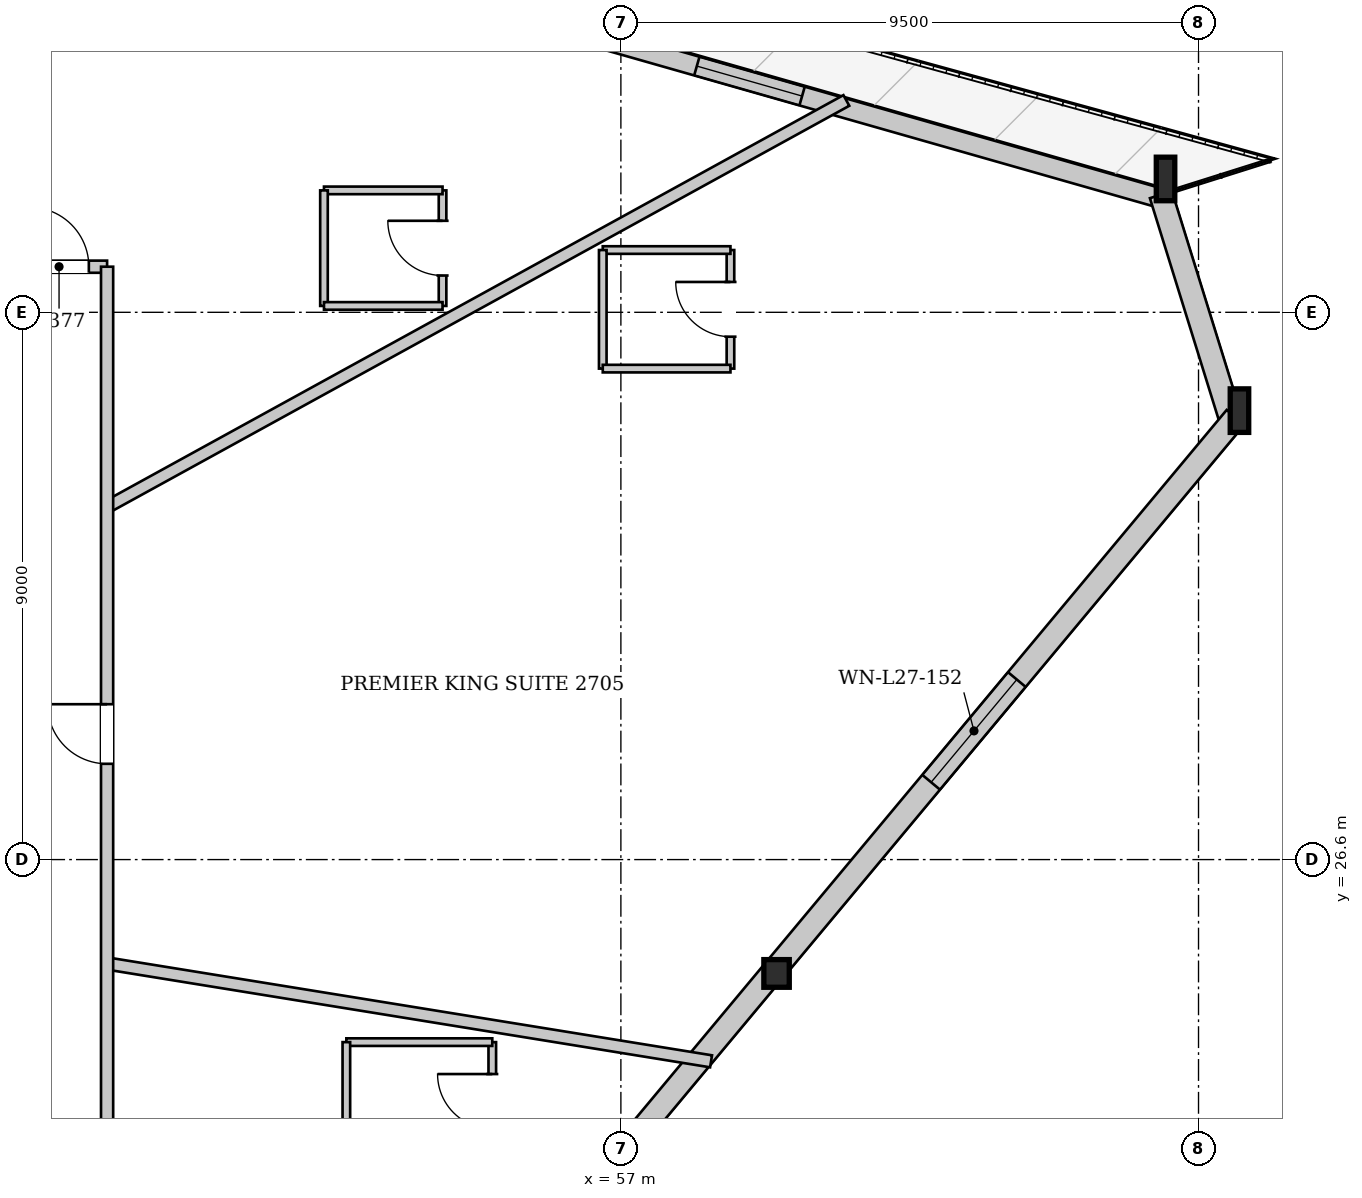
"""IFC4 building model, lengths in metres.
Left out: names, types, materials, properties, quantities, classifications, styles, units other than length and angle.
Written with IfcOpenShell. Run it as: python <this file> out.ifc"""

import sys

from ifc_helpers import new_model, si_unit, direction, frame, frame_2d, origin, origin_2d, place, context, subcontext, project, spatial, rectangle, i_section, extrude, source, transform, mapped, element, fill, save


model = new_model("IFC4")
c1 = context("Model", 3, precision=1e-05, world=origin(), true_north=direction((0.0, 1.0)))
c2 = subcontext(c1, "Body", "Model", "MODEL_VIEW")
j1 = project(units=[si_unit("LENGTHUNIT", "METRE"), si_unit("PLANEANGLEUNIT", "RADIAN")], contexts=[c1])
p1 = place(None, origin())
s1 = spatial("IfcSite", under=j1, at=p1, CompositionType="ELEMENT")
p2 = place(p1, origin())
s2 = spatial("IfcBuilding", under=s1, at=p2, CompositionType="ELEMENT")
p3 = place(p2, frame((0.0, 0.0, 105.7)))
s3 = spatial("IfcBuildingStorey", under=s2, at=p3, CompositionType="ELEMENT", Elevation=105.7)
m1 = source(origin(), c2, "Body", "SweptSolid", [
    extrude(i_section(OverallWidth=0.304, OverallDepth=0.716, WebThickness=0.021, FlangeThickness=0.04, at=origin_2d()), origin(), (0.0, 0.0, 1.0), 3.42),
])
p4 = place(p3, frame((67.255, 33.752, 0.0), z_axis=(-0.047894435472, 0.135260738032, 0.989651785123), x_axis=(-0.942650051896, -0.333782683284, 0.0)))
e1 = element("IfcColumn", 1, at=p4, inside=s3, PredefinedType="COLUMN", context=c2, shape_type="MappedRepresentation", body=[
    mapped(m1, transform((0.0, 0.0, 0.0), x_axis=(1.0, 0.0, 0.0), y_axis=(0.0, 1.0, 0.0), z_axis=(0.0, 0.0, 1.0), scale=1.0)),
])
m2 = source(origin(), c2, "Body", "SweptSolid", [
    extrude(i_section(OverallWidth=0.304, OverallDepth=0.716, WebThickness=0.021, FlangeThickness=0.04, at=origin_2d()), origin(), (0.0, 0.0, 1.0), 3.416),
])
p5 = place(p3, frame((66.063, 37.59, 0.0), z_axis=(-0.062036324357, 0.119141189749, 0.990937370052), x_axis=(-0.886964034529, -0.461838501483, 0.0)))
e2 = element("IfcColumn", 2, at=p5, inside=s3, PredefinedType="COLUMN", context=c2, shape_type="MappedRepresentation", body=[
    mapped(m2, transform((0.0, 0.0, 0.0), x_axis=(1.0, 0.0, 0.0), y_axis=(0.0, 1.0, 0.0), z_axis=(0.0, 0.0, 1.0), scale=1.0)),
])
m3 = source(origin(), c2, "Body", "SweptSolid", [
    extrude(i_section(OverallWidth=0.418, OverallDepth=0.455, WebThickness=0.038, FlangeThickness=0.059, at=origin_2d()), origin(), (0.0, 0.0, 1.0), 3.405),
])
p6 = place(p3, frame((59.573, 24.542, 0.0), z_axis=(-0.007456196647, 0.108760099163, 0.994040062554), x_axis=(-0.997658264016, -0.068395820341, 0.0)))
e3 = element("IfcColumn", 3, at=p6, inside=s3, PredefinedType="COLUMN", context=c2, shape_type="MappedRepresentation", body=[
    mapped(m3, transform((0.0, 0.0, 0.0), x_axis=(1.0, 0.0, 0.0), y_axis=(0.0, 1.0, 0.0), z_axis=(0.0, 0.0, 1.0), scale=1.0)),
])
p7 = place(p3, frame((43.53, 43.843, 0.0), z_axis=(0.0, 0.0, 1.0), x_axis=(0.961735223094, -0.273980584458, 0.0)))
e4 = element("IfcWall", 4, at=p7, inside=s3, PredefinedType="SOLIDWALL", context=c2, shape_type="SweptSolid", body=[
    extrude(rectangle(XDim=23.385, YDim=0.32, at=frame_2d((11.692, 0.0))), origin(), (0.0, 0.0, 1.0), 2.692),
])
p8 = place(p7, frame((6.933, 0.0, 0.0)))
e5 = element("IfcOpeningElement", 5, at=p8, cuts=e4, PredefinedType="OPENING", context=c2, shape_type="SweptSolid", body=[
    extrude(rectangle(XDim=1.1, YDim=2.3, at=frame_2d((0.55, 1.15))), frame((0.0, 0.17, 0.0), z_axis=(0.0, -1.0, 0.0), x_axis=(1.0, 0.0, 0.0)), (0.0, 0.0, 1.0), 0.34),
])
p9 = place(p7, frame((15.305, 0.0, 0.372)))
e6 = element("IfcOpeningElement", 6, at=p9, cuts=e4, PredefinedType="OPENING", context=c2, shape_type="SweptSolid", body=[
    extrude(rectangle(XDim=1.8, YDim=2.2, at=frame_2d((0.9, 1.1))), frame((0.0, 0.17, 0.0), z_axis=(0.0, -1.0, 0.0), x_axis=(1.0, 0.0, 0.0)), (0.0, 0.0, 1.0), 0.34),
])
p10 = place(p3, frame((65.882, 37.533, 0.0), z_axis=(0.0, 0.0, 1.0), x_axis=(0.296531061264, -0.955023208988, 0.0)))
e7 = element("IfcWall", 7, at=p10, inside=s3, PredefinedType="SOLIDWALL", context=c2, shape_type="SweptSolid", body=[
    extrude(rectangle(XDim=4.019, YDim=0.38, at=frame_2d((2.009, 0.0))), origin(), (0.0, 0.0, 1.0), 2.692),
])
p11 = place(p3, frame((67.109, 33.873, 0.0), z_axis=(0.0, 0.0, 1.0), x_axis=(-0.640571779822, -0.767898297234, 0.0)))
e8 = element("IfcWall", 8, at=p11, inside=s3, PredefinedType="SOLIDWALL", context=c2, shape_type="SweptSolid", body=[
    extrude(rectangle(XDim=23.985, YDim=0.38, at=frame_2d((11.993, 0.0))), origin(), (0.0, 0.0, 1.0), 2.692),
])
p12 = place(p11, frame((5.616, 0.0, 0.322)))
e9 = element("IfcOpeningElement", 9, at=p12, cuts=e8, PredefinedType="OPENING", context=c2, shape_type="SweptSolid", body=[
    extrude(rectangle(XDim=2.2, YDim=2.25, at=frame_2d((1.1, 1.125))), frame((0.0, 0.2, 0.0), z_axis=(0.0, -1.0, 0.0), x_axis=(1.0, 0.0, 0.0)), (0.0, 0.0, 1.0), 0.4),
])
p13 = place(p11, frame((16.169, 0.0, 0.322)))
e10 = element("IfcOpeningElement", 10, at=p13, cuts=e8, PredefinedType="OPENING", context=c2, shape_type="SweptSolid", body=[
    extrude(rectangle(XDim=2.2, YDim=2.25, at=frame_2d((1.1, 1.125))), frame((0.0, 0.2, 0.0), z_axis=(0.0, -1.0, 0.0), x_axis=(1.0, 0.0, 0.0)), (0.0, 0.0, 1.0), 0.4),
])
p14 = place(p3, frame((48.55, 24.891, 0.0), z_axis=(0.0, 0.0, 1.0), x_axis=(0.987134473354, -0.159892249709, 0.0)))
e11 = element("IfcWall", 11, at=p14, inside=s3, PredefinedType="PARTITIONING", context=c2, shape_type="SweptSolid", body=[
    extrude(rectangle(XDim=10.062, YDim=0.2, at=frame_2d((5.031, 0.0))), origin(), (0.0, 0.0, 1.0), 3.3),
])
p15 = place(p3, frame((48.55, 32.4, 0.0), z_axis=(0.0, 0.0, 1.0), x_axis=(0.87630505822, 0.481756624176, 0.0)))
e12 = element("IfcWall", 12, at=p15, inside=s3, PredefinedType="PARTITIONING", context=c2, shape_type="SweptSolid", body=[
    extrude(rectangle(XDim=13.875, YDim=0.2, at=frame_2d((6.937, 0.0))), origin(), (0.0, 0.0, 1.0), 3.3),
])
p16 = place(p3, frame((54.885, 21.648, 0.0), z_axis=(0.0, 0.0, 1.0), x_axis=(0.0, 1.0, 0.0)))
e13 = element("IfcWall", 13, at=p16, inside=s3, PredefinedType="PARTITIONING", context=c2, shape_type="SweptSolid", body=[
    extrude(rectangle(XDim=1.95, YDim=0.125, at=frame_2d((0.975, 0.0))), origin(), (0.0, 0.0, 1.0), 3.3),
])
p17 = place(p16, frame((0.525, 0.0, 0.0)))
e14 = element("IfcOpeningElement", 14, at=p17, cuts=e13, PredefinedType="OPENING", context=c2, shape_type="SweptSolid", body=[
    extrude(rectangle(XDim=0.9, YDim=2.1, at=frame_2d((0.45, 1.05))), frame((0.0, 0.073, 0.0), z_axis=(0.0, -1.0, 0.0), x_axis=(1.0, 0.0, 0.0)), (0.0, 0.0, 1.0), 0.145),
])
p18 = place(p3, frame((54.885, 23.598, 0.0), z_axis=(0.0, 0.0, 1.0), x_axis=(-1.0, 0.0, 0.0)))
e15 = element("IfcWall", 15, at=p18, inside=s3, PredefinedType="PARTITIONING", context=c2, shape_type="SweptSolid", body=[
    extrude(rectangle(XDim=2.4, YDim=0.125, at=frame_2d((1.2, 0.0))), origin(), (0.0, 0.0, 1.0), 3.3),
])
p19 = place(p3, frame((52.485, 23.598, 0.0), z_axis=(0.0, 0.0, 1.0), x_axis=(0.0, -1.0, 0.0)))
e16 = element("IfcWall", 16, at=p19, inside=s3, PredefinedType="PARTITIONING", context=c2, shape_type="SweptSolid", body=[
    extrude(rectangle(XDim=1.95, YDim=0.125, at=frame_2d((0.975, 0.0))), origin(), (0.0, 0.0, 1.0), 3.3),
])
p20 = place(p3, frame((58.802, 34.674, 0.0), z_axis=(0.0, 0.0, 1.0), x_axis=(0.0, 1.0, 0.0)))
e17 = element("IfcWall", 17, at=p20, inside=s3, PredefinedType="PARTITIONING", context=c2, shape_type="SweptSolid", body=[
    extrude(rectangle(XDim=1.95, YDim=0.125, at=frame_2d((0.975, 0.0))), origin(), (0.0, 0.0, 1.0), 3.3),
])
p21 = place(p20, frame((0.525, 0.0, 0.0)))
e18 = element("IfcOpeningElement", 18, at=p21, cuts=e17, PredefinedType="OPENING", context=c2, shape_type="SweptSolid", body=[
    extrude(rectangle(XDim=0.9, YDim=2.1, at=frame_2d((0.45, 1.05))), frame((0.0, 0.073, 0.0), z_axis=(0.0, -1.0, 0.0), x_axis=(1.0, 0.0, 0.0)), (0.0, 0.0, 1.0), 0.145),
])
p22 = place(p3, frame((58.802, 36.624, 0.0), z_axis=(0.0, 0.0, 1.0), x_axis=(-1.0, 0.0, 0.0)))
e19 = element("IfcWall", 19, at=p22, inside=s3, PredefinedType="PARTITIONING", context=c2, shape_type="SweptSolid", body=[
    extrude(rectangle(XDim=2.1, YDim=0.125, at=frame_2d((1.05, 0.0))), origin(), (0.0, 0.0, 1.0), 3.3),
])
p23 = place(p3, frame((56.702, 36.624, 0.0), z_axis=(0.0, 0.0, 1.0), x_axis=(0.0, -1.0, 0.0)))
e20 = element("IfcWall", 20, at=p23, inside=s3, PredefinedType="PARTITIONING", context=c2, shape_type="SweptSolid", body=[
    extrude(rectangle(XDim=1.95, YDim=0.125, at=frame_2d((0.975, 0.0))), origin(), (0.0, 0.0, 1.0), 3.3),
])
p24 = place(p3, frame((56.702, 34.674, 0.0), z_axis=(0.0, 0.0, 1.0), x_axis=(1.0, 0.0, 0.0)))
e21 = element("IfcWall", 21, at=p24, inside=s3, PredefinedType="PARTITIONING", context=c2, shape_type="SweptSolid", body=[
    extrude(rectangle(XDim=2.1, YDim=0.125, at=frame_2d((1.05, 0.0))), origin(), (0.0, 0.0, 1.0), 2.795),
])
p25 = place(p3, frame((54.067, 35.705, 0.0), z_axis=(0.0, 0.0, 1.0), x_axis=(0.0, 1.0, 0.0)))
e22 = element("IfcWall", 22, at=p25, inside=s3, PredefinedType="PARTITIONING", context=c2, shape_type="SweptSolid", body=[
    extrude(rectangle(XDim=1.9, YDim=0.125, at=frame_2d((0.95, 0.0))), origin(), (0.0, 0.0, 1.0), 3.3),
])
p26 = place(p25, frame((0.5, 0.0, 0.0)))
e23 = element("IfcOpeningElement", 23, at=p26, cuts=e22, PredefinedType="OPENING", context=c2, shape_type="SweptSolid", body=[
    extrude(rectangle(XDim=0.9, YDim=2.1, at=frame_2d((0.45, 1.05))), frame((0.0, 0.073, 0.0), z_axis=(0.0, -1.0, 0.0), x_axis=(1.0, 0.0, 0.0)), (0.0, 0.0, 1.0), 0.145),
])
p27 = place(p3, frame((54.067, 37.605, 0.0), z_axis=(0.0, 0.0, 1.0), x_axis=(-1.0, 0.0, 0.0)))
e24 = element("IfcWall", 24, at=p27, inside=s3, PredefinedType="PARTITIONING", context=c2, shape_type="SweptSolid", body=[
    extrude(rectangle(XDim=1.95, YDim=0.125, at=frame_2d((0.975, 0.0))), origin(), (0.0, 0.0, 1.0), 3.3),
])
p28 = place(p3, frame((52.117, 37.605, 0.0), z_axis=(0.0, 0.0, 1.0), x_axis=(0.0, -1.0, 0.0)))
e25 = element("IfcWall", 25, at=p28, inside=s3, PredefinedType="PARTITIONING", context=c2, shape_type="SweptSolid", body=[
    extrude(rectangle(XDim=1.9, YDim=0.125, at=frame_2d((0.95, 0.0))), origin(), (0.0, 0.0, 1.0), 3.3),
])
p29 = place(p3, frame((52.117, 35.705, 0.0), z_axis=(0.0, 0.0, 1.0), x_axis=(1.0, 0.0, 0.0)))
e26 = element("IfcWall", 26, at=p29, inside=s3, PredefinedType="PARTITIONING", context=c2, shape_type="SweptSolid", body=[
    extrude(rectangle(XDim=1.95, YDim=0.125, at=frame_2d((0.975, 0.0))), origin(), (0.0, 0.0, 1.0), 3.3),
])
p30 = place(p3, frame((27.45, 36.35, 0.0), z_axis=(0.0, 0.0, 1.0), x_axis=(1.0, 0.0, 0.0)))
e27 = element("IfcWall", 27, at=p30, inside=s3, PredefinedType="PARTITIONING", context=c2, shape_type="SweptSolid", body=[
    extrude(rectangle(XDim=21.1, YDim=0.2, at=frame_2d((10.55, 0.0))), origin(), (0.0, 0.0, 1.0), 3.3),
])
p31 = place(p30, frame((19.82, 0.0, 0.0)))
e28 = element("IfcOpeningElement", 28, at=p31, cuts=e27, PredefinedType="OPENING", context=c2, shape_type="SweptSolid", body=[
    extrude(rectangle(XDim=0.98, YDim=2.15, at=frame_2d((0.49, 1.075))), frame((0.0, 0.11, 0.0), z_axis=(0.0, -1.0, 0.0), x_axis=(1.0, 0.0, 0.0)), (0.0, 0.0, 1.0), 0.22),
])
p32 = place(p30, frame((5.605, 0.0, 0.0)))
e29 = element("IfcOpeningElement", 29, at=p32, cuts=e27, PredefinedType="OPENING", context=c2, shape_type="SweptSolid", body=[
    extrude(rectangle(XDim=0.98, YDim=2.15, at=frame_2d((0.49, 1.075))), frame((0.0, 0.11, 0.0), z_axis=(0.0, -1.0, 0.0), x_axis=(1.0, 0.0, 0.0)), (0.0, 0.0, 1.0), 0.22),
])
p33 = place(p3, frame((48.55, 16.85, 0.0), z_axis=(0.0, 0.0, 1.0), x_axis=(0.0, 1.0, 0.0)))
e30 = element("IfcWall", 30, at=p33, inside=s3, PredefinedType="PARTITIONING", context=c2, shape_type="SweptSolid", body=[
    extrude(rectangle(XDim=19.5, YDim=0.2, at=frame_2d((9.75, 0.0))), origin(), (0.0, 0.0, 1.0), 3.3),
])
p34 = place(p33, frame((1.869, 0.0, 0.0)))
e31 = element("IfcOpeningElement", 31, at=p34, cuts=e30, PredefinedType="OPENING", context=c2, shape_type="SweptSolid", body=[
    extrude(rectangle(XDim=0.98, YDim=2.15, at=frame_2d((0.49, 1.075))), frame((0.0, 0.11, 0.0), z_axis=(0.0, -1.0, 0.0), x_axis=(1.0, 0.0, 0.0)), (0.0, 0.0, 1.0), 0.22),
])
p35 = place(p33, frame((11.325, 0.0, 0.0)))
e32 = element("IfcOpeningElement", 32, at=p35, cuts=e30, PredefinedType="OPENING", context=c2, shape_type="SweptSolid", body=[
    extrude(rectangle(XDim=0.98, YDim=2.15, at=frame_2d((0.49, 1.075))), frame((0.0, 0.11, 0.0), z_axis=(0.0, -1.0, 0.0), x_axis=(1.0, 0.0, 0.0)), (0.0, 0.0, 1.0), 0.22),
])
m4 = source(origin(), c2, "Body", "SweptSolid", [
    extrude(rectangle(XDim=1.8, YDim=2.2, at=frame_2d((0.9, 1.1))), frame((0.0, 0.03, 0.0), z_axis=(0.0, -1.0, 0.0), x_axis=(1.0, 0.0, 0.0)), (0.0, 0.0, 1.0), 0.06),
])
p36 = place(p9, origin())
e33 = element("IfcWindow", 33, at=p36, inside=s3, PartitioningType="SINGLE_PANEL", PredefinedType="WINDOW", context=c2, shape_type="MappedRepresentation", body=[
    mapped(m4, transform((0.0, 0.0, 0.0), x_axis=(1.0, 0.0, 0.0), y_axis=(0.0, 1.0, 0.0), z_axis=(0.0, 0.0, 1.0), scale=1.0)),
])
fill(e6, e33)
m5 = source(origin(), c2, "Body", "SweptSolid", [
    extrude(rectangle(XDim=2.2, YDim=2.25, at=frame_2d((1.1, 1.125))), frame((0.0, 0.03, 0.0), z_axis=(0.0, -1.0, 0.0), x_axis=(1.0, 0.0, 0.0)), (0.0, 0.0, 1.0), 0.06),
])
p37 = place(p12, origin())
e34 = element("IfcWindow", 34, at=p37, inside=s3, PartitioningType="SINGLE_PANEL", PredefinedType="WINDOW", context=c2, shape_type="MappedRepresentation", body=[
    mapped(m5, transform((0.0, 0.0, 0.0), x_axis=(1.0, 0.0, 0.0), y_axis=(0.0, 1.0, 0.0), z_axis=(0.0, 0.0, 1.0), scale=1.0)),
])
fill(e9, e34)
m6 = source(origin(), c2, "Body", "SweptSolid", [
    extrude(rectangle(XDim=0.9, YDim=2.1, at=frame_2d((0.45, 1.05))), frame((0.0, 0.025, 0.0), z_axis=(0.0, -1.0, 0.0), x_axis=(1.0, 0.0, 0.0)), (0.0, 0.0, 1.0), 0.05),
])
p38 = place(p17, origin())
e35 = element("IfcDoor", 35, at=p38, inside=s3, OperationType="SINGLE_SWING_RIGHT", PredefinedType="DOOR", context=c2, shape_type="MappedRepresentation", body=[
    mapped(m6, transform((0.0, 0.0, 0.0), x_axis=(1.0, 0.0, 0.0), y_axis=(0.0, 1.0, 0.0), z_axis=(0.0, 0.0, 1.0), scale=1.0)),
])
fill(e14, e35)
p39 = place(p21, origin())
e36 = element("IfcDoor", 36, at=p39, inside=s3, OperationType="SINGLE_SWING_RIGHT", PredefinedType="DOOR", context=c2, shape_type="MappedRepresentation", body=[
    mapped(m6, transform((0.0, 0.0, 0.0), x_axis=(1.0, 0.0, 0.0), y_axis=(0.0, 1.0, 0.0), z_axis=(0.0, 0.0, 1.0), scale=1.0)),
])
fill(e18, e36)
p40 = place(p26, origin())
e37 = element("IfcDoor", 37, at=p40, inside=s3, OperationType="SINGLE_SWING_RIGHT", PredefinedType="DOOR", context=c2, shape_type="MappedRepresentation", body=[
    mapped(m6, transform((0.0, 0.0, 0.0), x_axis=(1.0, 0.0, 0.0), y_axis=(0.0, 1.0, 0.0), z_axis=(0.0, 0.0, 1.0), scale=1.0)),
])
fill(e23, e37)
m7 = source(origin(), c2, "Body", "SweptSolid", [
    extrude(rectangle(XDim=0.98, YDim=2.15, at=frame_2d((0.49, 1.075))), frame((0.0, 0.025, 0.0), z_axis=(0.0, -1.0, 0.0), x_axis=(1.0, 0.0, 0.0)), (0.0, 0.0, 1.0), 0.05),
])
p41 = place(p31, origin())
e38 = element("IfcDoor", 38, at=p41, inside=s3, OperationType="SINGLE_SWING_LEFT", PredefinedType="DOOR", context=c2, shape_type="MappedRepresentation", body=[
    mapped(m7, transform((0.0, 0.0, 0.0), x_axis=(1.0, 0.0, 0.0), y_axis=(0.0, 1.0, 0.0), z_axis=(0.0, 0.0, 1.0), scale=1.0)),
])
fill(e28, e38)
p42 = place(p35, origin())
e39 = element("IfcDoor", 39, at=p42, inside=s3, OperationType="SINGLE_SWING_RIGHT", PredefinedType="DOOR", context=c2, shape_type="MappedRepresentation", body=[
    mapped(m7, transform((0.0, 0.0, 0.0), x_axis=(1.0, 0.0, 0.0), y_axis=(0.0, 1.0, 0.0), z_axis=(0.0, 0.0, 1.0), scale=1.0)),
])
fill(e32, e39)
save(model, sys.argv[1])
